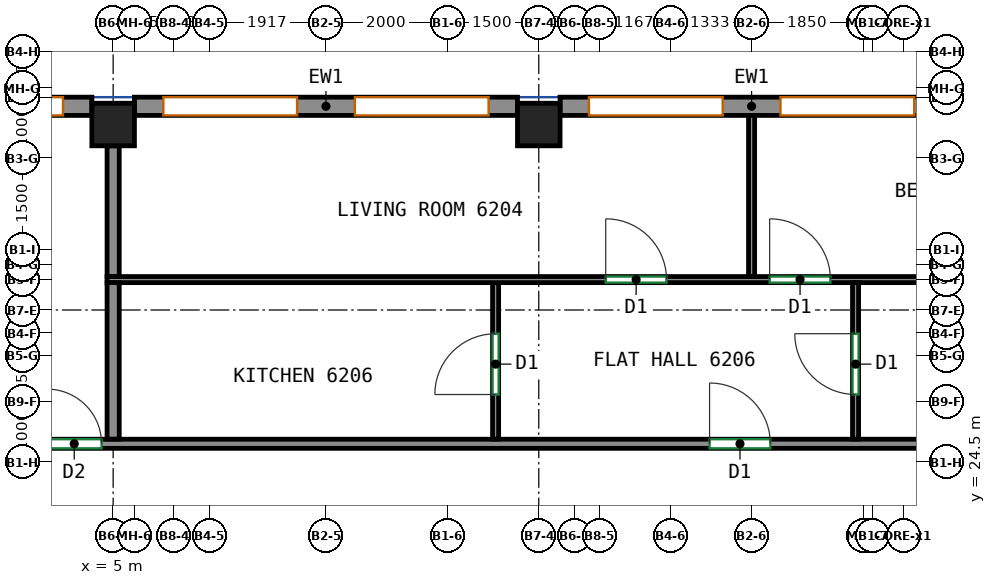
"""IFC4 building model, lengths in metres.
Left out: names, types, materials, properties, quantities, classifications, styles, units other than length and angle.
Written with IfcOpenShell. Run it as: python <this file> out.ifc"""

import sys

from ifc_helpers import new_model, si_unit, direction, frame, frame_2d, origin, origin_2d, place, context, subcontext, project, spatial, rectangle, extrude, source, transform, mapped, element, fill, save


model = new_model("IFC4")
c1 = context("Model", 3, precision=1e-05, world=origin(), true_north=direction((0.0, 1.0)))
c2 = subcontext(c1, "Body", "Model", "MODEL_VIEW")
j1 = project(units=[si_unit("LENGTHUNIT", "METRE"), si_unit("PLANEANGLEUNIT", "RADIAN")], contexts=[c1])
p1 = place(None, origin())
s1 = spatial("IfcSite", under=j1, at=p1, CompositionType="ELEMENT")
p2 = place(p1, origin())
s2 = spatial("IfcBuilding", under=s1, at=p2, CompositionType="ELEMENT")
p3 = place(p2, frame((0.0, 0.0, 256.0)))
s3 = spatial("IfcBuildingStorey", under=s2, at=p3, CompositionType="ELEMENT", Elevation=256.0)
m1 = source(origin(), c2, "Body", "SweptSolid", [
    extrude(rectangle(XDim=0.7, YDim=0.7, at=origin_2d()), origin(), (0.0, 0.0, 1.0), 3.12),
])
for number, where, z_axis, x_axis in (
    (1, (5.0, 30.05, 0.0), (0.0, 0.0, 1.0), (1.0, 0.0, 0.0)),
    (2, (12.0, 30.05, 0.0), (0.0, 0.0, 1.0), (1.0, 0.0, 0.0)),
):
    element("IfcColumn", number, at=place(p3, frame(where, z_axis=z_axis, x_axis=x_axis)), inside=s3, PredefinedType="COLUMN", context=c2, shape_type="MappedRepresentation", body=[
        mapped(m1, transform((0.0, 0.0, 0.0))),
    ])
m2 = source(origin(), c2, "Body", "SweptSolid", [
    extrude(rectangle(XDim=6.3, YDim=0.3, at=frame_2d((3.15, 0.0))), origin(), (0.0, 0.0, 1.0), 3.12),
])
p4 = place(p3, frame((18.65, 30.35, 0.0), z_axis=(0.0, 0.0, 1.0), x_axis=(-1.0, 0.0, 0.0)))
e3 = element("IfcWall", 3, at=p4, inside=s3, PredefinedType="SOLIDWALL", context=c2, shape_type="MappedRepresentation", body=[
    mapped(m2, transform((0.0, 0.0, 0.0))),
])
p5 = place(p4, frame((0.475, 0.0, 0.8)))
e4 = element("IfcOpeningElement", 4, at=p5, cuts=e3, PredefinedType="OPENING", context=c2, shape_type="SweptSolid", body=[
    extrude(rectangle(XDim=2.2, YDim=2.05, at=frame_2d((1.1, 1.025))), frame((0.0, 0.16, 0.0), z_axis=(0.0, -1.0, 0.0), x_axis=(1.0, 0.0, 0.0)), (0.0, 0.0, 1.0), 0.32),
])
p6 = place(p4, frame((3.625, 0.0, 0.8)))
e5 = element("IfcOpeningElement", 5, at=p6, cuts=e3, PredefinedType="OPENING", context=c2, shape_type="SweptSolid", body=[
    extrude(rectangle(XDim=2.2, YDim=2.05, at=frame_2d((1.1, 1.025))), frame((0.0, 0.16, 0.0), z_axis=(0.0, -1.0, 0.0), x_axis=(1.0, 0.0, 0.0)), (0.0, 0.0, 1.0), 0.32),
])
p7 = place(p3, frame((11.65, 30.35, 0.0), z_axis=(0.0, 0.0, 1.0), x_axis=(-1.0, 0.0, 0.0)))
e6 = element("IfcWall", 6, at=p7, inside=s3, PredefinedType="SOLIDWALL", context=c2, shape_type="MappedRepresentation", body=[
    mapped(m2, transform((0.0, 0.0, 0.0))),
])
p8 = place(p7, frame((0.475, 0.0, 0.8)))
e7 = element("IfcOpeningElement", 7, at=p8, cuts=e6, PredefinedType="OPENING", context=c2, shape_type="SweptSolid", body=[
    extrude(rectangle(XDim=2.2, YDim=2.05, at=frame_2d((1.1, 1.025))), frame((0.0, 0.16, 0.0), z_axis=(0.0, -1.0, 0.0), x_axis=(1.0, 0.0, 0.0)), (0.0, 0.0, 1.0), 0.32),
])
p9 = place(p7, frame((3.625, 0.0, 0.8)))
e8 = element("IfcOpeningElement", 8, at=p9, cuts=e6, PredefinedType="OPENING", context=c2, shape_type="SweptSolid", body=[
    extrude(rectangle(XDim=2.2, YDim=2.05, at=frame_2d((1.1, 1.025))), frame((0.0, 0.16, 0.0), z_axis=(0.0, -1.0, 0.0), x_axis=(1.0, 0.0, 0.0)), (0.0, 0.0, 1.0), 0.32),
])
p10 = place(p3, frame((4.65, 30.35, 0.0), z_axis=(0.0, 0.0, 1.0), x_axis=(-1.0, 0.0, 0.0)))
e9 = element("IfcWall", 9, at=p10, inside=s3, PredefinedType="SOLIDWALL", context=c2, shape_type="MappedRepresentation", body=[
    mapped(m2, transform((0.0, 0.0, 0.0))),
])
p11 = place(p10, frame((0.475, 0.0, 0.8)))
e10 = element("IfcOpeningElement", 10, at=p11, cuts=e9, PredefinedType="OPENING", context=c2, shape_type="SweptSolid", body=[
    extrude(rectangle(XDim=2.2, YDim=2.05, at=frame_2d((1.1, 1.025))), frame((0.0, 0.16, 0.0), z_axis=(0.0, -1.0, 0.0), x_axis=(1.0, 0.0, 0.0)), (0.0, 0.0, 1.0), 0.32),
])
p12 = place(p10, frame((3.625, 0.0, 0.8)))
e11 = element("IfcOpeningElement", 11, at=p12, cuts=e9, PredefinedType="OPENING", context=c2, shape_type="SweptSolid", body=[
    extrude(rectangle(XDim=2.2, YDim=2.05, at=frame_2d((1.1, 1.025))), frame((0.0, 0.16, 0.0), z_axis=(0.0, -1.0, 0.0), x_axis=(1.0, 0.0, 0.0)), (0.0, 0.0, 1.0), 0.32),
])
p13 = place(p3, frame((-16.075, 24.8, 0.0), z_axis=(0.0, 0.0, 1.0), x_axis=(1.0, 0.0, 0.0)))
e12 = element("IfcWall", 12, at=p13, inside=s3, PredefinedType="PARTITIONING", context=c2, shape_type="SweptSolid", body=[
    extrude(rectangle(XDim=36.073, YDim=0.15, at=frame_2d((18.037, 0.0))), origin(), (0.0, 0.0, 1.0), 3.12),
])
p14 = place(p13, frame((19.985, 0.0, 0.0)))
e13 = element("IfcOpeningElement", 13, at=p14, cuts=e12, PredefinedType="OPENING", context=c2, shape_type="SweptSolid", body=[
    extrude(rectangle(XDim=0.9, YDim=2.1, at=frame_2d((0.45, 1.05))), frame((0.0, 0.085, 0.0), z_axis=(0.0, -1.0, 0.0), x_axis=(1.0, 0.0, 0.0)), (0.0, 0.0, 1.0), 0.17),
])
p15 = place(p13, frame((30.884, 0.0, 0.0)))
e14 = element("IfcOpeningElement", 14, at=p15, cuts=e12, PredefinedType="OPENING", context=c2, shape_type="SweptSolid", body=[
    extrude(rectangle(XDim=1.0, YDim=2.1, at=frame_2d((0.5, 1.05))), frame((0.0, 0.085, 0.0), z_axis=(0.0, -1.0, 0.0), x_axis=(1.0, 0.0, 0.0)), (0.0, 0.0, 1.0), 0.17),
])
p16 = place(p3, frame((11.29, 24.877, 0.0), z_axis=(0.0, 0.0, 1.0), x_axis=(0.0, 1.0, 0.0)))
e15 = element("IfcWall", 15, at=p16, inside=s3, PredefinedType="PARTITIONING", context=c2, shape_type="SweptSolid", body=[
    extrude(rectangle(XDim=2.573, YDim=0.1, at=frame_2d((1.287, 0.0))), origin(), (0.0, 0.0, 1.0), 3.12),
])
p17 = place(p16, frame((0.733, 0.0, 0.0)))
e16 = element("IfcOpeningElement", 16, at=p17, cuts=e15, PredefinedType="OPENING", context=c2, shape_type="SweptSolid", body=[
    extrude(rectangle(XDim=1.0, YDim=2.1, at=frame_2d((0.5, 1.05))), frame((0.0, 0.06, 0.0), z_axis=(0.0, -1.0, 0.0), x_axis=(1.0, 0.0, 0.0)), (0.0, 0.0, 1.0), 0.12),
])
p18 = place(p3, frame((4.9, 27.5, 0.0), z_axis=(0.0, 0.0, 1.0), x_axis=(1.0, 0.0, 0.0)))
e17 = element("IfcWall", 17, at=p18, inside=s3, PredefinedType="PARTITIONING", context=c2, shape_type="SweptSolid", body=[
    extrude(rectangle(XDim=17.798, YDim=0.1, at=frame_2d((8.899, 0.0))), origin(), (0.0, 0.0, 1.0), 3.12),
])
p19 = place(p18, frame((8.201, 0.0, 0.0)))
e18 = element("IfcOpeningElement", 18, at=p19, cuts=e17, PredefinedType="OPENING", context=c2, shape_type="SweptSolid", body=[
    extrude(rectangle(XDim=1.0, YDim=2.1, at=frame_2d((0.5, 1.05))), frame((0.0, 0.06, 0.0), z_axis=(0.0, -1.0, 0.0), x_axis=(1.0, 0.0, 0.0)), (0.0, 0.0, 1.0), 0.12),
])
p20 = place(p18, frame((10.897, 0.0, 0.0)))
e19 = element("IfcOpeningElement", 19, at=p20, cuts=e17, PredefinedType="OPENING", context=c2, shape_type="SweptSolid", body=[
    extrude(rectangle(XDim=1.0, YDim=2.1, at=frame_2d((0.5, 1.05))), frame((0.0, 0.06, 0.0), z_axis=(0.0, -1.0, 0.0), x_axis=(1.0, 0.0, 0.0)), (0.0, 0.0, 1.0), 0.12),
])
p21 = place(p3, frame((5.0, 24.877, 0.0), z_axis=(0.0, 0.0, 1.0), x_axis=(0.0, 1.0, 0.0)))
e20 = element("IfcWall", 20, at=p21, inside=s3, PredefinedType="PARTITIONING", context=c2, shape_type="SweptSolid", body=[
    extrude(rectangle(XDim=2.573, YDim=0.2, at=frame_2d((1.287, 0.0))), origin(), (0.0, 0.0, 1.0), 3.12),
])
p22 = place(p3, frame((17.21, 24.877, 0.0), z_axis=(0.0, 0.0, 1.0), x_axis=(0.0, 1.0, 0.0)))
e21 = element("IfcWall", 21, at=p22, inside=s3, PredefinedType="PARTITIONING", context=c2, shape_type="SweptSolid", body=[
    extrude(rectangle(XDim=2.573, YDim=0.1, at=frame_2d((1.287, 0.0))), origin(), (0.0, 0.0, 1.0), 3.12),
])
p23 = place(p22, frame((0.733, 0.0, 0.0)))
e22 = element("IfcOpeningElement", 22, at=p23, cuts=e21, PredefinedType="OPENING", context=c2, shape_type="SweptSolid", body=[
    extrude(rectangle(XDim=1.0, YDim=2.1, at=frame_2d((0.5, 1.05))), frame((0.0, 0.06, 0.0), z_axis=(0.0, -1.0, 0.0), x_axis=(1.0, 0.0, 0.0)), (0.0, 0.0, 1.0), 0.12),
])
p24 = place(p3, frame((15.5, 27.552, 0.0), z_axis=(0.0, 0.0, 1.0), x_axis=(0.0, 1.0, 0.0)))
e23 = element("IfcWall", 23, at=p24, inside=s3, PredefinedType="PARTITIONING", context=c2, shape_type="SweptSolid", body=[
    extrude(rectangle(XDim=2.698, YDim=0.1, at=frame_2d((1.349, 0.0))), origin(), (0.0, 0.0, 1.0), 3.12),
])
p25 = place(p3, frame((5.0, 27.552, 0.0), z_axis=(0.0, 0.0, 1.0), x_axis=(0.0, 1.0, 0.0)))
e24 = element("IfcWall", 24, at=p25, inside=s3, PredefinedType="PARTITIONING", context=c2, shape_type="SweptSolid", body=[
    extrude(rectangle(XDim=2.148, YDim=0.2, at=frame_2d((1.074, 0.0))), origin(), (0.0, 0.0, 1.0), 3.12),
])
p26 = place(p5, origin())
e25 = element("IfcWindow", 25, at=p26, inside=s3, PartitioningType="SINGLE_PANEL", PredefinedType="WINDOW", context=c2, shape_type="SweptSolid", body=[
    extrude(rectangle(XDim=2.2, YDim=2.05, at=frame_2d((1.1, 1.025))), frame((0.0, 0.03, 0.0), z_axis=(0.0, -1.0, 0.0), x_axis=(1.0, 0.0, 0.0)), (0.0, 0.0, 1.0), 0.06),
])
fill(e4, e25)
p27 = place(p6, origin())
e26 = element("IfcWindow", 26, at=p27, inside=s3, PartitioningType="SINGLE_PANEL", PredefinedType="WINDOW", context=c2, shape_type="SweptSolid", body=[
    extrude(rectangle(XDim=2.2, YDim=2.05, at=frame_2d((1.1, 1.025))), frame((0.0, 0.03, 0.0), z_axis=(0.0, -1.0, 0.0), x_axis=(1.0, 0.0, 0.0)), (0.0, 0.0, 1.0), 0.06),
])
fill(e5, e26)
p28 = place(p8, origin())
e27 = element("IfcWindow", 27, at=p28, inside=s3, PartitioningType="SINGLE_PANEL", PredefinedType="WINDOW", context=c2, shape_type="SweptSolid", body=[
    extrude(rectangle(XDim=2.2, YDim=2.05, at=frame_2d((1.1, 1.025))), frame((0.0, 0.03, 0.0), z_axis=(0.0, -1.0, 0.0), x_axis=(1.0, 0.0, 0.0)), (0.0, 0.0, 1.0), 0.06),
])
fill(e7, e27)
p29 = place(p9, origin())
e28 = element("IfcWindow", 28, at=p29, inside=s3, PartitioningType="SINGLE_PANEL", PredefinedType="WINDOW", context=c2, shape_type="SweptSolid", body=[
    extrude(rectangle(XDim=2.2, YDim=2.05, at=frame_2d((1.1, 1.025))), frame((0.0, 0.03, 0.0), z_axis=(0.0, -1.0, 0.0), x_axis=(1.0, 0.0, 0.0)), (0.0, 0.0, 1.0), 0.06),
])
fill(e8, e28)
p30 = place(p11, origin())
e29 = element("IfcWindow", 29, at=p30, inside=s3, PartitioningType="SINGLE_PANEL", PredefinedType="WINDOW", context=c2, shape_type="SweptSolid", body=[
    extrude(rectangle(XDim=2.2, YDim=2.05, at=frame_2d((1.1, 1.025))), frame((0.0, 0.03, 0.0), z_axis=(0.0, -1.0, 0.0), x_axis=(1.0, 0.0, 0.0)), (0.0, 0.0, 1.0), 0.06),
])
fill(e10, e29)
p31 = place(p14, origin())
e30 = element("IfcDoor", 30, at=p31, inside=s3, OperationType="SINGLE_SWING_LEFT", PredefinedType="DOOR", context=c2, shape_type="SweptSolid", body=[
    extrude(rectangle(XDim=0.9, YDim=2.1, at=frame_2d((0.45, 1.05))), frame((0.0, 0.025, 0.0), z_axis=(0.0, -1.0, 0.0), x_axis=(1.0, 0.0, 0.0)), (0.0, 0.0, 1.0), 0.05),
])
fill(e13, e30)
p32 = place(p15, origin())
e31 = element("IfcDoor", 31, at=p32, inside=s3, OperationType="SINGLE_SWING_LEFT", PredefinedType="DOOR", context=c2, shape_type="SweptSolid", body=[
    extrude(rectangle(XDim=1.0, YDim=2.1, at=frame_2d((0.5, 1.05))), frame((0.0, 0.025, 0.0), z_axis=(0.0, -1.0, 0.0), x_axis=(1.0, 0.0, 0.0)), (0.0, 0.0, 1.0), 0.05),
])
fill(e14, e31)
p33 = place(p17, origin())
e32 = element("IfcDoor", 32, at=p33, inside=s3, OperationType="SINGLE_SWING_LEFT", PredefinedType="DOOR", context=c2, shape_type="SweptSolid", body=[
    extrude(rectangle(XDim=1.0, YDim=2.1, at=frame_2d((0.5, 1.05))), frame((0.0, 0.025, 0.0), z_axis=(0.0, -1.0, 0.0), x_axis=(1.0, 0.0, 0.0)), (0.0, 0.0, 1.0), 0.05),
])
fill(e16, e32)
p34 = place(p23, origin())
e33 = element("IfcDoor", 33, at=p34, inside=s3, OperationType="SINGLE_SWING_RIGHT", PredefinedType="DOOR", context=c2, shape_type="SweptSolid", body=[
    extrude(rectangle(XDim=1.0, YDim=2.1, at=frame_2d((0.5, 1.05))), frame((0.0, 0.025, 0.0), z_axis=(0.0, -1.0, 0.0), x_axis=(1.0, 0.0, 0.0)), (0.0, 0.0, 1.0), 0.05),
])
fill(e22, e33)
p35 = place(p19, origin())
e34 = element("IfcDoor", 34, at=p35, inside=s3, OperationType="SINGLE_SWING_LEFT", PredefinedType="DOOR", context=c2, shape_type="SweptSolid", body=[
    extrude(rectangle(XDim=1.0, YDim=2.1, at=frame_2d((0.5, 1.05))), frame((0.0, 0.025, 0.0), z_axis=(0.0, -1.0, 0.0), x_axis=(1.0, 0.0, 0.0)), (0.0, 0.0, 1.0), 0.05),
])
fill(e18, e34)
p36 = place(p20, origin())
e35 = element("IfcDoor", 35, at=p36, inside=s3, OperationType="SINGLE_SWING_LEFT", PredefinedType="DOOR", context=c2, shape_type="SweptSolid", body=[
    extrude(rectangle(XDim=1.0, YDim=2.1, at=frame_2d((0.5, 1.05))), frame((0.0, 0.025, 0.0), z_axis=(0.0, -1.0, 0.0), x_axis=(1.0, 0.0, 0.0)), (0.0, 0.0, 1.0), 0.05),
])
fill(e19, e35)
save(model, sys.argv[1])
